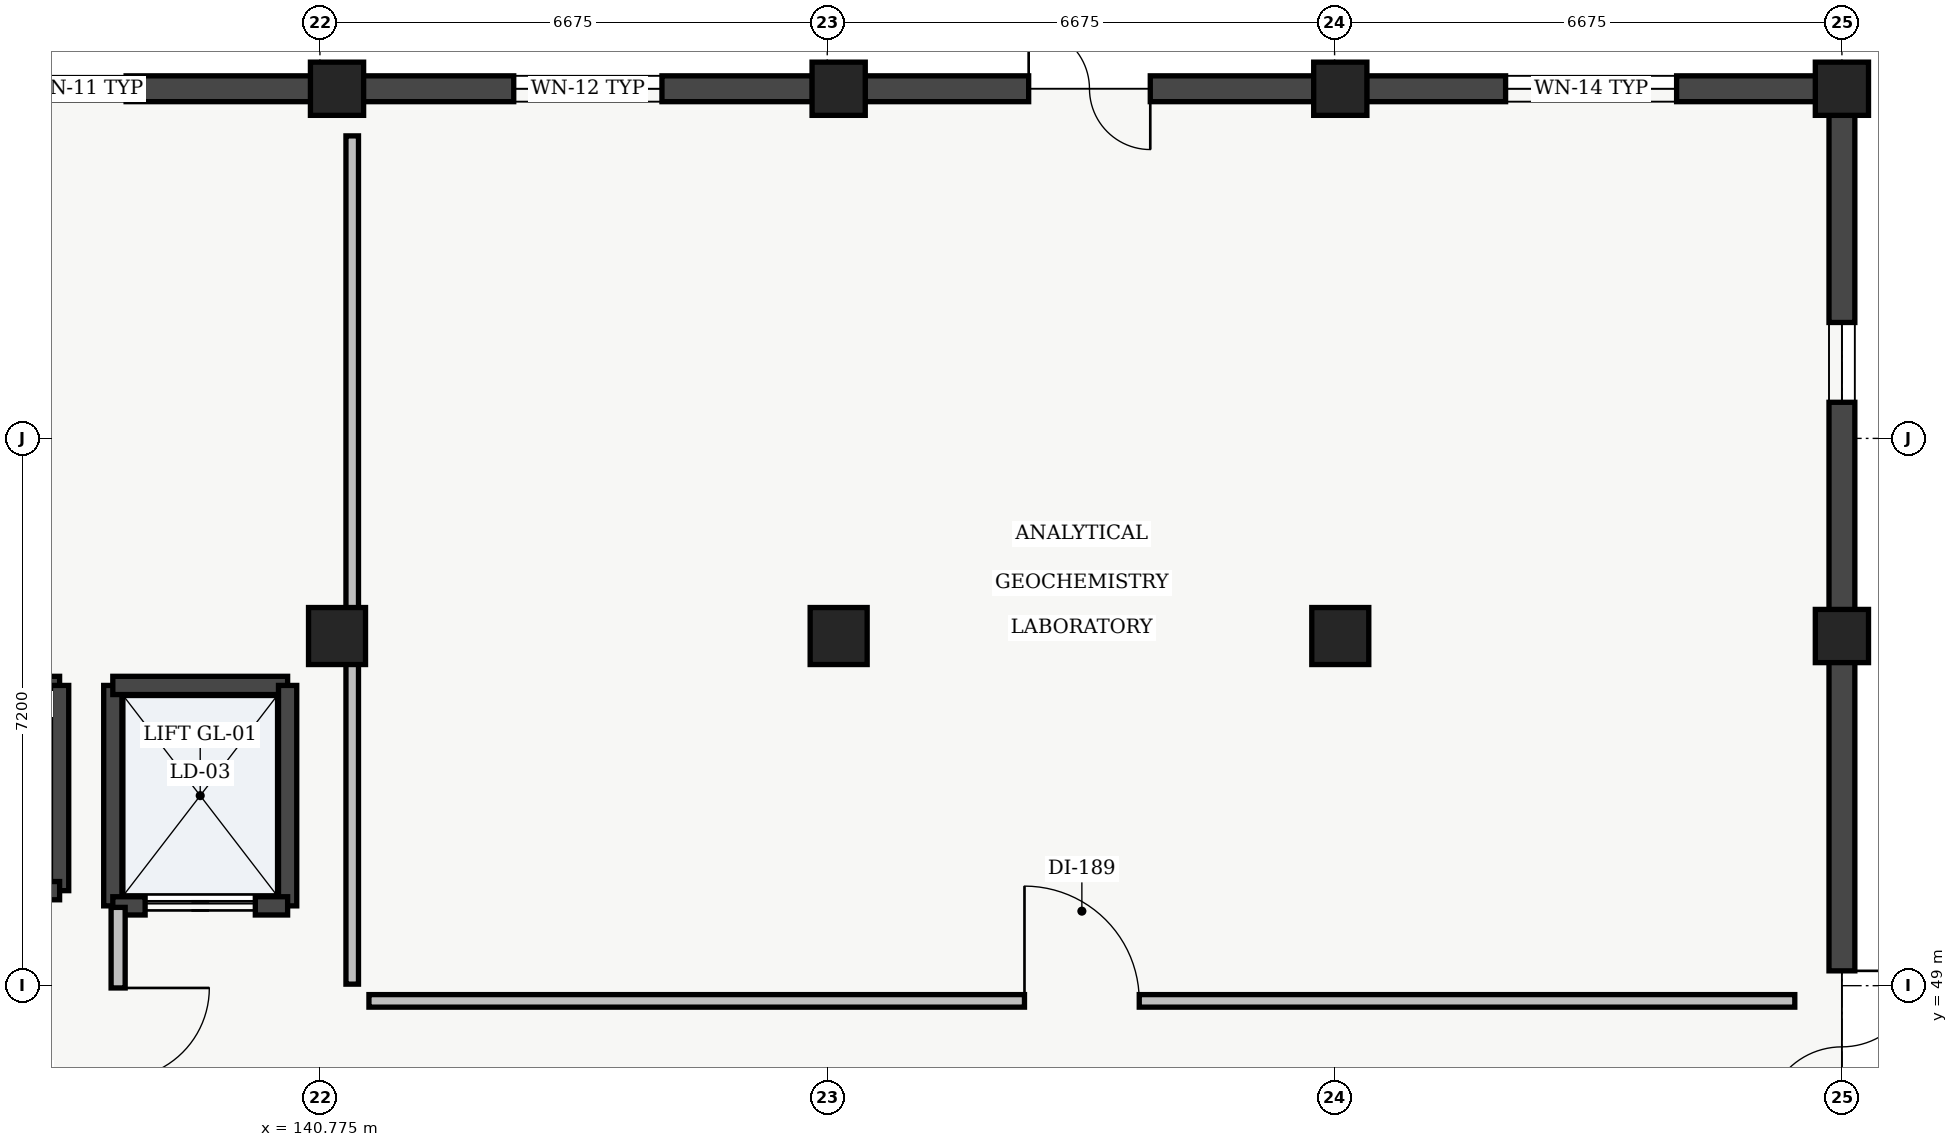
"""IFC4 building model, lengths in metres.
Left out: names, types, materials, properties, quantities, classifications, styles, units other than length and angle.
Written with IfcOpenShell. Run it as: python <this file> out.ifc"""

import sys

from ifc_helpers import new_model, si_unit, direction, frame, frame_2d, origin, origin_2d, place, context, subcontext, project, spatial, rectangle, extrude, element, fill, save


model = new_model("IFC4")
c1 = context("Model", 3, precision=1e-05, world=origin(), true_north=direction((0.0, 1.0)))
c2 = subcontext(c1, "Body", "Model", "MODEL_VIEW")
j1 = project(units=[si_unit("LENGTHUNIT", "METRE"), si_unit("PLANEANGLEUNIT", "RADIAN")], contexts=[c1])
p1 = place(None, origin())
s1 = spatial("IfcSite", under=j1, at=p1, CompositionType="ELEMENT")
p2 = place(p1, origin())
s2 = spatial("IfcBuilding", under=s1, at=p2, CompositionType="ELEMENT")
p3 = place(p2, origin())
s3 = spatial("IfcBuildingStorey", under=s2, at=p3, CompositionType="ELEMENT", Elevation=0.0)
p4 = place(p3, frame((141.0, 53.6, 0.0), z_axis=(0.0, 0.0, 1.0), x_axis=(1.0, 0.0, 0.0)))
e1 = element("IfcColumn", 1, at=p4, inside=s3, PredefinedType="COLUMN", context=c2, shape_type="SweptSolid", body=[
    extrude(rectangle(XDim=0.75, YDim=0.75, at=origin_2d()), origin(), (0.0, 0.0, 1.0), 4.9),
])
p5 = place(p3, frame((141.0, 60.8, 0.0), z_axis=(0.0, 0.0, 1.0), x_axis=(1.0, 0.0, 0.0)))
e2 = element("IfcColumn", 2, at=p5, inside=s3, PredefinedType="COLUMN", context=c2, shape_type="SweptSolid", body=[
    extrude(rectangle(XDim=0.7, YDim=0.7, at=origin_2d()), origin(), (0.0, 0.0, 1.0), 4.9),
])
p6 = place(p3, frame((147.6, 53.6, 0.0), z_axis=(0.0, 0.0, 1.0), x_axis=(1.0, 0.0, 0.0)))
e3 = element("IfcColumn", 3, at=p6, inside=s3, PredefinedType="COLUMN", context=c2, shape_type="SweptSolid", body=[
    extrude(rectangle(XDim=0.75, YDim=0.75, at=origin_2d()), origin(), (0.0, 0.0, 1.0), 4.9),
])
p7 = place(p3, frame((147.6, 60.8, 0.0), z_axis=(0.0, 0.0, 1.0), x_axis=(1.0, 0.0, 0.0)))
e4 = element("IfcColumn", 4, at=p7, inside=s3, PredefinedType="COLUMN", context=c2, shape_type="SweptSolid", body=[
    extrude(rectangle(XDim=0.7, YDim=0.7, at=origin_2d()), origin(), (0.0, 0.0, 1.0), 4.9),
])
p8 = place(p3, frame((154.2, 53.6, 0.0), z_axis=(0.0, 0.0, 1.0), x_axis=(1.0, 0.0, 0.0)))
e5 = element("IfcColumn", 5, at=p8, inside=s3, PredefinedType="COLUMN", context=c2, shape_type="SweptSolid", body=[
    extrude(rectangle(XDim=0.75, YDim=0.75, at=origin_2d()), origin(), (0.0, 0.0, 1.0), 4.9),
])
for number, where, z_axis, x_axis in (
    (6, (154.2, 60.8, 0.0), (0.0, 0.0, 1.0), (1.0, 0.0, 0.0)),
    (7, (160.8, 53.6, 0.0), (0.0, 0.0, 1.0), (1.0, 0.0, 0.0)),
    (8, (160.8, 60.8, 0.0), (0.0, 0.0, 1.0), (1.0, 0.0, 0.0)),
):
    element("IfcColumn", number, at=place(p3, frame(where, z_axis=z_axis, x_axis=x_axis)), inside=s3, PredefinedType="COLUMN", context=c2, shape_type="SweptSolid", body=[
        extrude(rectangle(XDim=0.7, YDim=0.7, at=origin_2d()), origin(), (0.0, 0.0, 1.0), 4.9),
    ])
p9 = place(p3, frame((134.745, 60.8, 0.0), z_axis=(0.0, 0.0, 1.0), x_axis=(1.0, 0.0, 0.0)))
e9 = element("IfcWall", 9, at=p9, inside=s3, PredefinedType="SOLIDWALL", context=c2, shape_type="SweptSolid", body=[
    extrude(rectangle(XDim=5.91, YDim=0.34, at=frame_2d((2.955, 0.0))), origin(), (0.0, 0.0, 1.0), 4.435),
])
p10 = place(p9, frame((2.43, 0.0, 0.95)))
e10 = element("IfcOpeningElement", 10, at=p10, cuts=e9, PredefinedType="OPENING", context=c2, shape_type="SweptSolid", body=[
    extrude(rectangle(XDim=1.05, YDim=1.2, at=frame_2d((0.525, 0.6))), frame((0.0, 0.17, 0.0), z_axis=(0.0, -1.0, 0.0), x_axis=(1.0, 0.0, 0.0)), (0.0, 0.0, 1.0), 0.34),
])
p11 = place(p3, frame((141.345, 60.8, 0.0), z_axis=(0.0, 0.0, 1.0), x_axis=(1.0, 0.0, 0.0)))
e11 = element("IfcWall", 11, at=p11, inside=s3, PredefinedType="SOLIDWALL", context=c2, shape_type="SweptSolid", body=[
    extrude(rectangle(XDim=5.91, YDim=0.34, at=frame_2d((2.955, 0.0))), origin(), (0.0, 0.0, 1.0), 4.435),
])
p12 = place(p11, frame((1.98, 0.0, 0.95)))
e12 = element("IfcOpeningElement", 12, at=p12, cuts=e11, PredefinedType="OPENING", context=c2, shape_type="SweptSolid", body=[
    extrude(rectangle(XDim=1.95, YDim=1.5, at=frame_2d((0.975, 0.75))), frame((0.0, 0.17, 0.0), z_axis=(0.0, -1.0, 0.0), x_axis=(1.0, 0.0, 0.0)), (0.0, 0.0, 1.0), 0.34),
])
p13 = place(p3, frame((147.945, 60.8, 0.0), z_axis=(0.0, 0.0, 1.0), x_axis=(1.0, 0.0, 0.0)))
e13 = element("IfcWall", 13, at=p13, inside=s3, PredefinedType="SOLIDWALL", context=c2, shape_type="SweptSolid", body=[
    extrude(rectangle(XDim=5.91, YDim=0.34, at=frame_2d((2.955, 0.0))), origin(), (0.0, 0.0, 1.0), 4.435),
])
p14 = place(p13, frame((2.155, 0.0, 0.0)))
e14 = element("IfcOpeningElement", 14, at=p14, cuts=e13, PredefinedType="OPENING", context=c2, shape_type="SweptSolid", body=[
    extrude(rectangle(XDim=1.6, YDim=2.2, at=frame_2d((0.8, 1.1))), frame((0.0, 0.17, 0.0), z_axis=(0.0, -1.0, 0.0), x_axis=(1.0, 0.0, 0.0)), (0.0, 0.0, 1.0), 0.34),
])
p15 = place(p3, frame((154.545, 60.8, 0.0), z_axis=(0.0, 0.0, 1.0), x_axis=(1.0, 0.0, 0.0)))
e15 = element("IfcWall", 15, at=p15, inside=s3, PredefinedType="SOLIDWALL", context=c2, shape_type="SweptSolid", body=[
    extrude(rectangle(XDim=5.91, YDim=0.34, at=frame_2d((2.955, 0.0))), origin(), (0.0, 0.0, 1.0), 4.435),
])
p16 = place(p15, frame((1.83, 0.0, 0.95)))
e16 = element("IfcOpeningElement", 16, at=p16, cuts=e15, PredefinedType="OPENING", context=c2, shape_type="SweptSolid", body=[
    extrude(rectangle(XDim=2.25, YDim=1.55, at=frame_2d((1.125, 0.775))), frame((0.0, 0.17, 0.0), z_axis=(0.0, -1.0, 0.0), x_axis=(1.0, 0.0, 0.0)), (0.0, 0.0, 1.0), 0.34),
])
p17 = place(p3, frame((160.8, 60.455, 0.0), z_axis=(0.0, 0.0, 1.0), x_axis=(0.0, -1.0, 0.0)))
e17 = element("IfcWall", 17, at=p17, inside=s3, PredefinedType="SOLIDWALL", context=c2, shape_type="SweptSolid", body=[
    extrude(rectangle(XDim=6.51, YDim=0.34, at=frame_2d((3.255, 0.0))), origin(), (0.0, 0.0, 1.0), 4.435),
])
p18 = place(p17, frame((2.73, 0.0, 0.95)))
e18 = element("IfcOpeningElement", 18, at=p18, cuts=e17, PredefinedType="OPENING", context=c2, shape_type="SweptSolid", body=[
    extrude(rectangle(XDim=1.05, YDim=1.2, at=frame_2d((0.525, 0.6))), frame((0.0, 0.17, 0.0), z_axis=(0.0, -1.0, 0.0), x_axis=(1.0, 0.0, 0.0)), (0.0, 0.0, 1.0), 0.34),
])
p19 = place(p3, frame((160.8, 53.255, 0.0), z_axis=(0.0, 0.0, 1.0), x_axis=(0.0, -1.0, 0.0)))
e19 = element("IfcWall", 19, at=p19, inside=s3, PredefinedType="SOLIDWALL", context=c2, shape_type="SweptSolid", body=[
    extrude(rectangle(XDim=6.51, YDim=0.34, at=frame_2d((3.255, 0.0))), origin(), (0.0, 0.0, 1.0), 4.435),
])
p20 = place(p19, frame((4.06, 0.0, 0.0)))
e20 = element("IfcOpeningElement", 20, at=p20, cuts=e19, PredefinedType="OPENING", context=c2, shape_type="SweptSolid", body=[
    extrude(rectangle(XDim=2.0, YDim=2.25, at=frame_2d((1.0, 1.125))), frame((0.0, 0.17, 0.0), z_axis=(0.0, -1.0, 0.0), x_axis=(1.0, 0.0, 0.0)), (0.0, 0.0, 1.0), 0.34),
])
p21 = place(p3, frame((135.45, 52.95, 0.0), z_axis=(0.0, 0.0, 1.0), x_axis=(1.0, 0.0, 0.0)))
e21 = element("IfcWall", 21, at=p21, inside=s3, PredefinedType="SHEAR", context=c2, shape_type="SweptSolid", body=[
    extrude(rectangle(XDim=1.9, YDim=0.24, at=frame_2d((0.95, 0.0))), origin(), (0.0, 0.0, 1.0), 4.88),
])
p22 = place(p3, frame((137.35, 52.95, 0.0), z_axis=(0.0, 0.0, 1.0), x_axis=(0.0, -1.0, 0.0)))
e22 = element("IfcWall", 22, at=p22, inside=s3, PredefinedType="SHEAR", context=c2, shape_type="SweptSolid", body=[
    extrude(rectangle(XDim=2.7, YDim=0.24, at=frame_2d((1.35, 0.0))), origin(), (0.0, 0.0, 1.0), 4.88),
])
p23 = place(p3, frame((137.35, 50.25, 0.0), z_axis=(0.0, 0.0, 1.0), x_axis=(-1.0, 0.0, 0.0)))
e23 = element("IfcWall", 23, at=p23, inside=s3, PredefinedType="SHEAR", context=c2, shape_type="SweptSolid", body=[
    extrude(rectangle(XDim=1.9, YDim=0.24, at=frame_2d((0.95, 0.0))), origin(), (0.0, 0.0, 1.0), 4.88),
])
p24 = place(p23, frame((0.325, 0.0, 0.0)))
e24 = element("IfcOpeningElement", 24, at=p24, cuts=e23, PredefinedType="OPENING", context=c2, shape_type="SweptSolid", body=[
    extrude(rectangle(XDim=1.25, YDim=2.2, at=frame_2d((0.625, 1.1))), frame((0.0, 0.12, 0.0), z_axis=(0.0, -1.0, 0.0), x_axis=(1.0, 0.0, 0.0)), (0.0, 0.0, 1.0), 0.24),
])
p25 = place(p3, frame((138.05, 50.05, 0.0), z_axis=(0.0, 0.0, 1.0), x_axis=(0.0, 1.0, 0.0)))
e25 = element("IfcWall", 25, at=p25, inside=s3, PredefinedType="SHEAR", context=c2, shape_type="SweptSolid", body=[
    extrude(rectangle(XDim=2.9, YDim=0.24, at=frame_2d((1.45, 0.0))), origin(), (0.0, 0.0, 1.0), 4.88),
])
p26 = place(p3, frame((138.05, 52.95, 0.0), z_axis=(0.0, 0.0, 1.0), x_axis=(1.0, 0.0, 0.0)))
e26 = element("IfcWall", 26, at=p26, inside=s3, PredefinedType="SHEAR", context=c2, shape_type="SweptSolid", body=[
    extrude(rectangle(XDim=2.3, YDim=0.24, at=frame_2d((1.15, 0.0))), origin(), (0.0, 0.0, 1.0), 4.88),
])
p27 = place(p3, frame((140.35, 52.95, 0.0), z_axis=(0.0, 0.0, 1.0), x_axis=(0.0, -1.0, 0.0)))
e27 = element("IfcWall", 27, at=p27, inside=s3, PredefinedType="SHEAR", context=c2, shape_type="SweptSolid", body=[
    extrude(rectangle(XDim=2.9, YDim=0.24, at=frame_2d((1.45, 0.0))), origin(), (0.0, 0.0, 1.0), 4.88),
])
p28 = place(p3, frame((140.35, 50.05, 0.0), z_axis=(0.0, 0.0, 1.0), x_axis=(-1.0, 0.0, 0.0)))
e28 = element("IfcWall", 28, at=p28, inside=s3, PredefinedType="SHEAR", context=c2, shape_type="SweptSolid", body=[
    extrude(rectangle(XDim=2.3, YDim=0.24, at=frame_2d((1.15, 0.0))), origin(), (0.0, 0.0, 1.0), 4.88),
])
p29 = place(p28, frame((0.425, 0.0, 0.0)))
e29 = element("IfcOpeningElement", 29, at=p29, cuts=e28, PredefinedType="OPENING", context=c2, shape_type="SweptSolid", body=[
    extrude(rectangle(XDim=1.45, YDim=2.3, at=frame_2d((0.725, 1.15))), frame((0.0, 0.12, 0.0), z_axis=(0.0, -1.0, 0.0), x_axis=(1.0, 0.0, 0.0)), (0.0, 0.0, 1.0), 0.24),
])
p30 = place(p3, frame((138.12, 47.52, 0.0), z_axis=(0.0, 0.0, 1.0), x_axis=(0.0, 1.0, 0.0)))
e30 = element("IfcWall", 30, at=p30, inside=s3, PredefinedType="SOLIDWALL", context=c2, shape_type="SweptSolid", body=[
    extrude(rectangle(XDim=2.51, YDim=0.185, at=frame_2d((1.255, 0.0))), origin(), (0.0, 0.0, 1.0), 4.55),
])
p31 = place(p30, frame((0.25, 0.0, 0.0)))
e31 = element("IfcOpeningElement", 31, at=p31, cuts=e30, PredefinedType="OPENING", context=c2, shape_type="SweptSolid", body=[
    extrude(rectangle(XDim=1.2, YDim=2.15, at=frame_2d((0.6, 1.075))), frame((0.0, 0.093, 0.0), z_axis=(0.0, -1.0, 0.0), x_axis=(1.0, 0.0, 0.0)), (0.0, 0.0, 1.0), 0.185),
])
p32 = place(p3, frame((141.42, 48.8, 0.0), z_axis=(0.0, 0.0, 1.0), x_axis=(1.0, 0.0, 0.0)))
e32 = element("IfcWall", 32, at=p32, inside=s3, PredefinedType="PARTITIONING", context=c2, shape_type="SweptSolid", body=[
    extrude(rectangle(XDim=18.76, YDim=0.165, at=frame_2d((9.38, 0.0))), origin(), (0.0, 0.0, 1.0), 4.485),
])
p33 = place(p32, frame((8.625, 0.0, 0.0)))
e33 = element("IfcOpeningElement", 33, at=p33, cuts=e32, PredefinedType="OPENING", context=c2, shape_type="SweptSolid", body=[
    extrude(rectangle(XDim=1.51, YDim=2.12, at=frame_2d((0.755, 1.06))), frame((0.0, 0.083, 0.0), z_axis=(0.0, -1.0, 0.0), x_axis=(1.0, 0.0, 0.0)), (0.0, 0.0, 1.0), 0.165),
])
p34 = place(p3, frame((141.2, 60.18, 0.0), z_axis=(0.0, 0.0, 1.0), x_axis=(0.0, -1.0, 0.0)))
e34 = element("IfcWall", 34, at=p34, inside=s3, PredefinedType="PARTITIONING", context=c2, shape_type="SweptSolid", body=[
    extrude(rectangle(XDim=11.16, YDim=0.165, at=frame_2d((5.58, 0.0))), origin(), (0.0, 0.0, 1.0), 4.235),
])
p35 = place(p10, origin())
e35 = element("IfcWindow", 35, at=p35, inside=s3, PartitioningType="SINGLE_PANEL", PredefinedType="WINDOW", context=c2, shape_type="SweptSolid", body=[
    extrude(rectangle(XDim=1.05, YDim=1.2, at=frame_2d((0.525, 0.6))), frame((0.0, 0.03, 0.0), z_axis=(0.0, -1.0, 0.0), x_axis=(1.0, 0.0, 0.0)), (0.0, 0.0, 1.0), 0.06),
])
fill(e10, e35)
p36 = place(p12, origin())
e36 = element("IfcWindow", 36, at=p36, inside=s3, PartitioningType="SINGLE_PANEL", PredefinedType="WINDOW", context=c2, shape_type="SweptSolid", body=[
    extrude(rectangle(XDim=1.95, YDim=1.5, at=frame_2d((0.975, 0.75))), frame((0.0, 0.03, 0.0), z_axis=(0.0, -1.0, 0.0), x_axis=(1.0, 0.0, 0.0)), (0.0, 0.0, 1.0), 0.06),
])
fill(e12, e36)
p37 = place(p14, origin())
e37 = element("IfcDoor", 37, at=p37, inside=s3, OperationType="DOUBLE_DOOR_SINGLE_SWING", PredefinedType="DOOR", context=c2, shape_type="SweptSolid", body=[
    extrude(rectangle(XDim=1.6, YDim=2.2, at=frame_2d((0.8, 1.1))), frame((0.0, 0.025, 0.0), z_axis=(0.0, -1.0, 0.0), x_axis=(1.0, 0.0, 0.0)), (0.0, 0.0, 1.0), 0.05),
])
fill(e14, e37)
p38 = place(p16, origin())
e38 = element("IfcWindow", 38, at=p38, inside=s3, PartitioningType="SINGLE_PANEL", PredefinedType="WINDOW", context=c2, shape_type="SweptSolid", body=[
    extrude(rectangle(XDim=2.25, YDim=1.55, at=frame_2d((1.125, 0.775))), frame((0.0, 0.03, 0.0), z_axis=(0.0, -1.0, 0.0), x_axis=(1.0, 0.0, 0.0)), (0.0, 0.0, 1.0), 0.06),
])
fill(e16, e38)
p39 = place(p18, origin())
e39 = element("IfcWindow", 39, at=p39, inside=s3, PartitioningType="SINGLE_PANEL", PredefinedType="WINDOW", context=c2, shape_type="SweptSolid", body=[
    extrude(rectangle(XDim=1.05, YDim=1.2, at=frame_2d((0.525, 0.6))), frame((0.0, 0.03, 0.0), z_axis=(0.0, -1.0, 0.0), x_axis=(1.0, 0.0, 0.0)), (0.0, 0.0, 1.0), 0.06),
])
fill(e18, e39)
p40 = place(p20, origin())
e40 = element("IfcDoor", 40, at=p40, inside=s3, OperationType="DOUBLE_DOOR_SINGLE_SWING", PredefinedType="DOOR", context=c2, shape_type="SweptSolid", body=[
    extrude(rectangle(XDim=2.0, YDim=2.25, at=frame_2d((1.0, 1.125))), frame((0.0, 0.025, 0.0), z_axis=(0.0, -1.0, 0.0), x_axis=(1.0, 0.0, 0.0)), (0.0, 0.0, 1.0), 0.05),
])
fill(e20, e40)
p41 = place(p29, origin())
e41 = element("IfcDoor", 41, at=p41, inside=s3, OperationType="DOUBLE_DOOR_SLIDING", PredefinedType="DOOR", context=c2, shape_type="SweptSolid", body=[
    extrude(rectangle(XDim=1.45, YDim=2.3, at=frame_2d((0.725, 1.15))), frame((0.0, 0.025, 0.0), z_axis=(0.0, -1.0, 0.0), x_axis=(1.0, 0.0, 0.0)), (0.0, 0.0, 1.0), 0.05),
])
fill(e29, e41)
p42 = place(p31, origin())
e42 = element("IfcDoor", 42, at=p42, inside=s3, OperationType="SINGLE_SWING_RIGHT", PredefinedType="DOOR", context=c2, shape_type="SweptSolid", body=[
    extrude(rectangle(XDim=1.2, YDim=2.15, at=frame_2d((0.6, 1.075))), frame((0.0, 0.025, 0.0), z_axis=(0.0, -1.0, 0.0), x_axis=(1.0, 0.0, 0.0)), (0.0, 0.0, 1.0), 0.05),
])
fill(e31, e42)
p43 = place(p33, origin())
e43 = element("IfcDoor", 43, at=p43, inside=s3, OperationType="SINGLE_SWING_LEFT", PredefinedType="DOOR", context=c2, shape_type="SweptSolid", body=[
    extrude(rectangle(XDim=1.51, YDim=2.12, at=frame_2d((0.755, 1.06))), frame((0.0, 0.025, 0.0), z_axis=(0.0, -1.0, 0.0), x_axis=(1.0, 0.0, 0.0)), (0.0, 0.0, 1.0), 0.05),
])
fill(e33, e43)
save(model, sys.argv[1])
